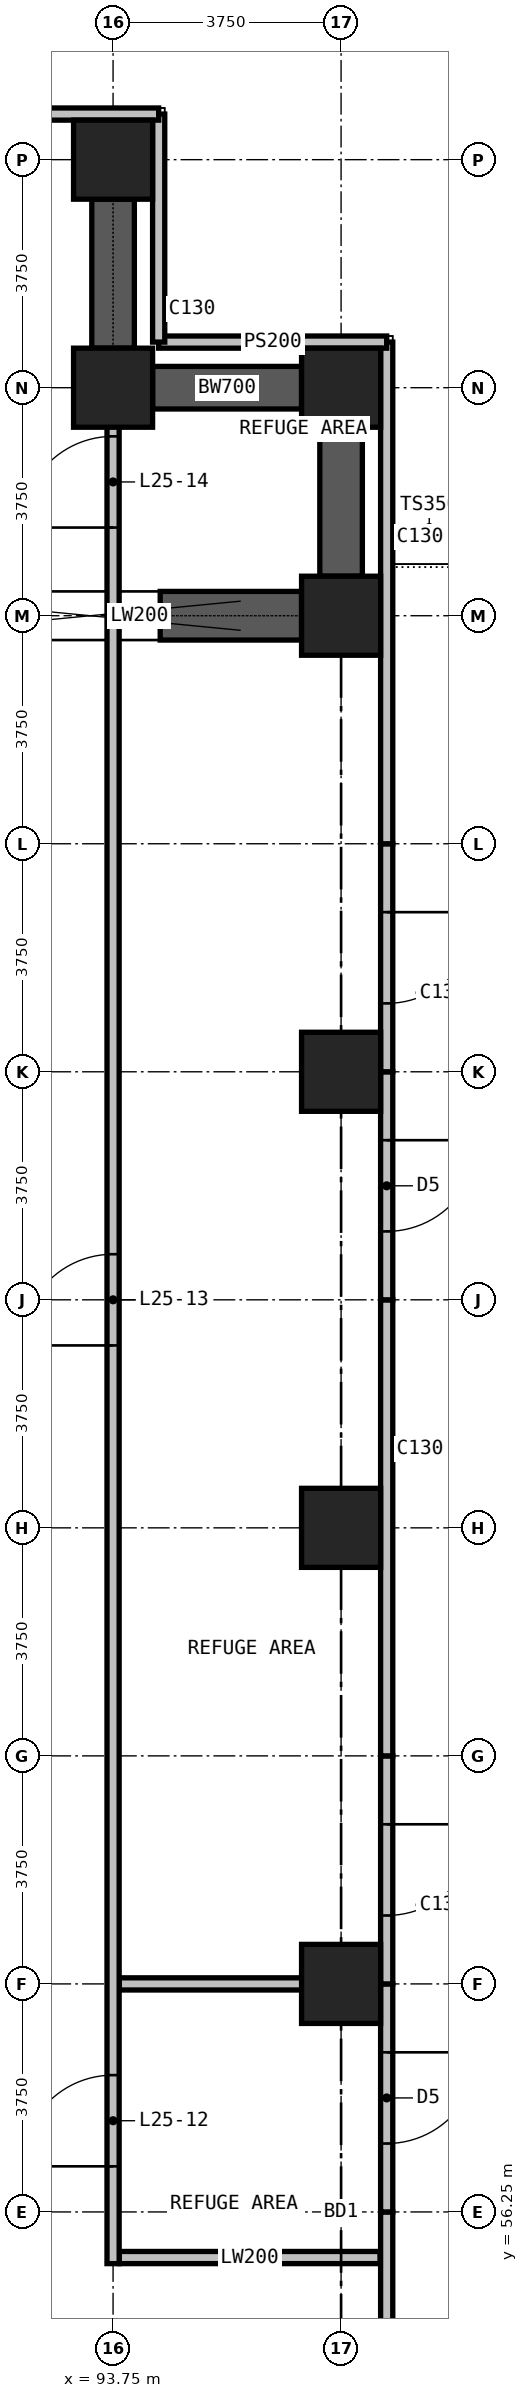
"""IFC4 building model, lengths in metres.
Left out: names, types, materials, properties, quantities, classifications, styles, units other than length and angle.
Written with IfcOpenShell. Run it as: python <this file> out.ifc"""

import sys

from ifc_helpers import new_model, si_unit, direction, frame, frame_2d, origin, origin_2d, place, context, subcontext, project, spatial, rectangle, extrude, element, fill, save


model = new_model("IFC4")
c1 = context("Model", 3, precision=1e-05, world=origin(), true_north=direction((0.0, 1.0)))
c2 = subcontext(c1, "Body", "Model", "MODEL_VIEW")
j1 = project(units=[si_unit("LENGTHUNIT", "METRE"), si_unit("PLANEANGLEUNIT", "RADIAN")], contexts=[c1])
p1 = place(None, origin())
s1 = spatial("IfcSite", under=j1, at=p1, CompositionType="ELEMENT")
p2 = place(p1, origin())
s2 = spatial("IfcBuilding", under=s1, at=p2, CompositionType="ELEMENT")
p3 = place(p2, frame((0.0, 0.0, 102.2)))
s3 = spatial("IfcBuildingStorey", under=s2, at=p3, CompositionType="ELEMENT", Elevation=102.2)
for number, where, z_axis, x_axis in (
    (1, (93.75, 86.25, 0.0), (0.0, 0.0, 1.0), (1.0, 0.0, 0.0)),
    (2, (93.75, 90.0, 0.0), (0.0, 0.0, 1.0), (1.0, 0.0, 0.0)),
    (3, (97.5, 60.0, 0.0), (0.0, 0.0, 1.0), (1.0, 0.0, 0.0)),
    (4, (97.5, 67.5, 0.0), (0.0, 0.0, 1.0), (1.0, 0.0, 0.0)),
    (5, (97.5, 75.0, 0.0), (0.0, 0.0, 1.0), (1.0, 0.0, 0.0)),
    (6, (97.5, 82.5, 0.0), (0.0, 0.0, 1.0), (1.0, 0.0, 0.0)),
    (7, (97.5, 86.25, 0.0), (0.0, 0.0, 1.0), (1.0, 0.0, 0.0)),
):
    element("IfcColumn", number, at=place(p3, frame(where, z_axis=z_axis, x_axis=x_axis)), inside=s3, PredefinedType="COLUMN", context=c2, shape_type="SweptSolid", body=[
        extrude(rectangle(XDim=1.3, YDim=1.3, at=origin_2d()), origin(), (0.0, 0.0, 1.0), 5.0),
    ])
for number, where, z_axis, x_axis in (
    (8, (93.75, 89.35, 0.0), (0.0, 0.0, 1.0), (0.0, -1.0, 0.0)),
    (9, (94.4, 86.25, 0.0), (0.0, 0.0, 1.0), (1.0, 0.0, 0.0)),
    (10, (97.5, 85.6, 0.0), (0.0, 0.0, 1.0), (0.0, -1.0, 0.0)),
):
    element("IfcWall", number, at=place(p3, frame(where, z_axis=z_axis, x_axis=x_axis)), inside=s3, PredefinedType="SHEAR", context=c2, shape_type="SweptSolid", body=[
        extrude(rectangle(XDim=2.45, YDim=0.7, at=frame_2d((1.225, 0.0))), origin(), (0.0, 0.0, 1.0), 4.7),
    ])
p4 = place(p3, frame((94.525, 82.5, 0.0), z_axis=(0.0, 0.0, 1.0), x_axis=(1.0, 0.0, 0.0)))
e11 = element("IfcWall", 11, at=p4, inside=s3, PredefinedType="SHEAR", context=c2, shape_type="SweptSolid", body=[
    extrude(rectangle(XDim=2.325, YDim=0.8, at=frame_2d((1.163, 0.0))), origin(), (0.0, 0.0, 1.0), 4.7),
])
p5 = place(p3, frame((98.25, 51.75, 0.0), z_axis=(0.0, 0.0, 1.0), x_axis=(0.0, 1.0, 0.0)))
e12 = element("IfcWall", 12, at=p5, inside=s3, PredefinedType="SOLIDWALL", context=c2, shape_type="SweptSolid", body=[
    extrude(rectangle(XDim=4.5, YDim=0.2, at=frame_2d((2.25, 0.0))), origin(), (0.0, 0.0, 1.0), 4.7),
])
p6 = place(p3, frame((98.25, 60.0, 0.0), z_axis=(0.0, 0.0, 1.0), x_axis=(0.0, -1.0, 0.0)))
e13 = element("IfcWall", 13, at=p6, inside=s3, PredefinedType="SOLIDWALL", context=c2, shape_type="SweptSolid", body=[
    extrude(rectangle(XDim=3.75, YDim=0.2, at=frame_2d((1.875, 0.0))), origin(), (0.0, 0.0, 1.0), 4.7),
])
p7 = place(p6, frame((1.125, 0.0, 0.0)))
e14 = element("IfcOpeningElement", 14, at=p7, cuts=e13, PredefinedType="OPENING", context=c2, shape_type="SweptSolid", body=[
    extrude(rectangle(XDim=1.5, YDim=2.4, at=frame_2d((0.75, 1.2))), frame((0.0, 0.11, 0.0), z_axis=(0.0, -1.0, 0.0), x_axis=(1.0, 0.0, 0.0)), (0.0, 0.0, 1.0), 0.22),
])
p8 = place(p3, frame((98.25, 63.75, 0.0), z_axis=(0.0, 0.0, 1.0), x_axis=(0.0, -1.0, 0.0)))
e15 = element("IfcWall", 15, at=p8, inside=s3, PredefinedType="SOLIDWALL", context=c2, shape_type="SweptSolid", body=[
    extrude(rectangle(XDim=3.75, YDim=0.2, at=frame_2d((1.875, 0.0))), origin(), (0.0, 0.0, 1.0), 4.7),
])
p9 = place(p8, frame((1.125, 0.0, 0.0)))
e16 = element("IfcOpeningElement", 16, at=p9, cuts=e15, PredefinedType="OPENING", context=c2, shape_type="SweptSolid", body=[
    extrude(rectangle(XDim=1.5, YDim=2.4, at=frame_2d((0.75, 1.2))), frame((0.0, 0.11, 0.0), z_axis=(0.0, -1.0, 0.0), x_axis=(1.0, 0.0, 0.0)), (0.0, 0.0, 1.0), 0.22),
])
p10 = place(p3, frame((98.25, 63.75, 0.0), z_axis=(0.0, 0.0, 1.0), x_axis=(0.0, 1.0, 0.0)))
e17 = element("IfcWall", 17, at=p10, inside=s3, PredefinedType="SOLIDWALL", context=c2, shape_type="SweptSolid", body=[
    extrude(rectangle(XDim=7.5, YDim=0.2, at=frame_2d((3.75, 0.0))), origin(), (0.0, 0.0, 1.0), 4.7),
])
p11 = place(p3, frame((98.25, 75.0, 0.0), z_axis=(0.0, 0.0, 1.0), x_axis=(0.0, -1.0, 0.0)))
e18 = element("IfcWall", 18, at=p11, inside=s3, PredefinedType="SOLIDWALL", context=c2, shape_type="SweptSolid", body=[
    extrude(rectangle(XDim=3.75, YDim=0.2, at=frame_2d((1.875, 0.0))), origin(), (0.0, 0.0, 1.0), 4.7),
])
p12 = place(p11, frame((1.125, 0.0, 0.0)))
e19 = element("IfcOpeningElement", 19, at=p12, cuts=e18, PredefinedType="OPENING", context=c2, shape_type="SweptSolid", body=[
    extrude(rectangle(XDim=1.5, YDim=2.4, at=frame_2d((0.75, 1.2))), frame((0.0, 0.11, 0.0), z_axis=(0.0, -1.0, 0.0), x_axis=(1.0, 0.0, 0.0)), (0.0, 0.0, 1.0), 0.22),
])
p13 = place(p3, frame((98.25, 78.75, 0.0), z_axis=(0.0, 0.0, 1.0), x_axis=(0.0, -1.0, 0.0)))
e20 = element("IfcWall", 20, at=p13, inside=s3, PredefinedType="SOLIDWALL", context=c2, shape_type="SweptSolid", body=[
    extrude(rectangle(XDim=3.75, YDim=0.2, at=frame_2d((1.875, 0.0))), origin(), (0.0, 0.0, 1.0), 4.7),
])
p14 = place(p13, frame((1.125, 0.0, 0.0)))
e21 = element("IfcOpeningElement", 21, at=p14, cuts=e20, PredefinedType="OPENING", context=c2, shape_type="SweptSolid", body=[
    extrude(rectangle(XDim=1.5, YDim=2.4, at=frame_2d((0.75, 1.2))), frame((0.0, 0.11, 0.0), z_axis=(0.0, -1.0, 0.0), x_axis=(1.0, 0.0, 0.0)), (0.0, 0.0, 1.0), 0.22),
])
p15 = place(p3, frame((98.25, 78.75, 0.0), z_axis=(0.0, 0.0, 1.0), x_axis=(0.0, 1.0, 0.0)))
e22 = element("IfcWall", 22, at=p15, inside=s3, PredefinedType="SOLIDWALL", context=c2, shape_type="SweptSolid", body=[
    extrude(rectangle(XDim=8.25, YDim=0.2, at=frame_2d((4.125, 0.0))), origin(), (0.0, 0.0, 1.0), 4.7),
])
for number, where, z_axis, x_axis in (
    (23, (94.5, 87.0, 0.0), (0.0, 0.0, 1.0), (1.0, 0.0, 0.0)),
    (24, (94.5, 87.0, 0.0), (0.0, 0.0, 1.0), (0.0, 1.0, 0.0)),
    (25, (90.75, 90.75, 0.0), (0.0, 0.0, 1.0), (1.0, 0.0, 0.0)),
):
    element("IfcWall", number, at=place(p3, frame(where, z_axis=z_axis, x_axis=x_axis)), inside=s3, PredefinedType="SOLIDWALL", context=c2, shape_type="SweptSolid", body=[
        extrude(rectangle(XDim=3.75, YDim=0.2, at=frame_2d((1.875, 0.0))), origin(), (0.0, 0.0, 1.0), 4.7),
    ])
for number, where, z_axis, x_axis in (
    (26, (93.85, 55.5, 0.0), (0.0, 0.0, 1.0), (1.0, 0.0, 0.0)),
    (27, (93.85, 60.0, 0.0), (0.0, 0.0, 1.0), (1.0, 0.0, 0.0)),
):
    element("IfcWall", number, at=place(p3, frame(where, z_axis=z_axis, x_axis=x_axis)), inside=s3, PredefinedType="PARTITIONING", context=c2, shape_type="SweptSolid", body=[
        extrude(rectangle(XDim=4.29, YDim=0.2, at=frame_2d((2.145, 0.0))), origin(), (0.0, 0.0, 1.0), 4.7),
    ])
p16 = place(p3, frame((93.85, 82.5, 0.0), z_axis=(0.0, 0.0, 1.0), x_axis=(1.0, 0.0, 0.0)))
e28 = element("IfcWall", 28, at=p16, inside=s3, PredefinedType="PARTITIONING", context=c2, shape_type="SweptSolid", body=[
    extrude(rectangle(XDim=0.665, YDim=0.2, at=frame_2d((0.333, 0.0))), origin(), (0.0, 0.0, 1.0), 2.4),
])
p17 = place(p3, frame((96.86, 82.5, 0.0), z_axis=(0.0, 0.0, 1.0), x_axis=(1.0, 0.0, 0.0)))
e29 = element("IfcWall", 29, at=p17, inside=s3, PredefinedType="PARTITIONING", context=c2, shape_type="SweptSolid", body=[
    extrude(rectangle(XDim=1.28, YDim=0.2, at=frame_2d((0.64, 0.0))), origin(), (0.0, 0.0, 1.0), 4.7),
])
p18 = place(p3, frame((93.75, 55.4, 0.0), z_axis=(0.0, 0.0, 1.0), x_axis=(0.0, 1.0, 0.0)))
e30 = element("IfcWall", 30, at=p18, inside=s3, PredefinedType="PARTITIONING", context=c2, shape_type="SweptSolid", body=[
    extrude(rectangle(XDim=31.49, YDim=0.2, at=frame_2d((15.745, 0.0))), origin(), (0.0, 0.0, 1.0), 4.7),
])
p19 = place(p18, frame((1.6, 0.0, 0.0)))
e31 = element("IfcOpeningElement", 31, at=p19, cuts=e30, PredefinedType="OPENING", context=c2, shape_type="SweptSolid", body=[
    extrude(rectangle(XDim=1.5, YDim=2.2, at=frame_2d((0.75, 1.1))), frame((0.0, 0.11, 0.0), z_axis=(0.0, -1.0, 0.0), x_axis=(1.0, 0.0, 0.0)), (0.0, 0.0, 1.0), 0.22),
])
p20 = place(p18, frame((15.1, 0.0, 0.0)))
e32 = element("IfcOpeningElement", 32, at=p20, cuts=e30, PredefinedType="OPENING", context=c2, shape_type="SweptSolid", body=[
    extrude(rectangle(XDim=1.5, YDim=2.2, at=frame_2d((0.75, 1.1))), frame((0.0, 0.11, 0.0), z_axis=(0.0, -1.0, 0.0), x_axis=(1.0, 0.0, 0.0)), (0.0, 0.0, 1.0), 0.22),
])
p21 = place(p18, frame((28.55, 0.0, 0.0)))
e33 = element("IfcOpeningElement", 33, at=p21, cuts=e30, PredefinedType="OPENING", context=c2, shape_type="SweptSolid", body=[
    extrude(rectangle(XDim=1.5, YDim=2.2, at=frame_2d((0.75, 1.1))), frame((0.0, 0.11, 0.0), z_axis=(0.0, -1.0, 0.0), x_axis=(1.0, 0.0, 0.0)), (0.0, 0.0, 1.0), 0.22),
])
p22 = place(p3, frame((93.75, 89.36, 0.0), z_axis=(0.0, 0.0, 1.0), x_axis=(0.0, 1.0, 0.0)))
e34 = element("IfcWall", 34, at=p22, inside=s3, PredefinedType="PARTITIONING", context=c2, shape_type="SweptSolid", body=[
    extrude(rectangle(XDim=1.28, YDim=0.2, at=frame_2d((0.64, 0.0))), origin(), (0.0, 0.0, 1.0), 4.7),
])
p23 = place(p7, origin())
e35 = element("IfcDoor", 35, at=p23, inside=s3, OperationType="DOUBLE_DOOR_SINGLE_SWING", PredefinedType="DOOR", context=c2, shape_type="SweptSolid", body=[
    extrude(rectangle(XDim=1.5, YDim=2.4, at=frame_2d((0.75, 1.2))), frame((0.0, 0.025, 0.0), z_axis=(0.0, -1.0, 0.0), x_axis=(1.0, 0.0, 0.0)), (0.0, 0.0, 1.0), 0.05),
])
fill(e14, e35)
p24 = place(p9, origin())
e36 = element("IfcDoor", 36, at=p24, inside=s3, OperationType="DOUBLE_DOOR_SINGLE_SWING", PredefinedType="DOOR", context=c2, shape_type="SweptSolid", body=[
    extrude(rectangle(XDim=1.5, YDim=2.4, at=frame_2d((0.75, 1.2))), frame((0.0, 0.025, 0.0), z_axis=(0.0, -1.0, 0.0), x_axis=(1.0, 0.0, 0.0)), (0.0, 0.0, 1.0), 0.05),
])
fill(e16, e36)
p25 = place(p12, origin())
e37 = element("IfcDoor", 37, at=p25, inside=s3, OperationType="DOUBLE_DOOR_SINGLE_SWING", PredefinedType="DOOR", context=c2, shape_type="SweptSolid", body=[
    extrude(rectangle(XDim=1.5, YDim=2.4, at=frame_2d((0.75, 1.2))), frame((0.0, 0.025, 0.0), z_axis=(0.0, -1.0, 0.0), x_axis=(1.0, 0.0, 0.0)), (0.0, 0.0, 1.0), 0.05),
])
fill(e19, e37)
p26 = place(p14, origin())
e38 = element("IfcDoor", 38, at=p26, inside=s3, OperationType="DOUBLE_DOOR_SINGLE_SWING", PredefinedType="DOOR", context=c2, shape_type="SweptSolid", body=[
    extrude(rectangle(XDim=1.5, YDim=2.4, at=frame_2d((0.75, 1.2))), frame((0.0, 0.025, 0.0), z_axis=(0.0, -1.0, 0.0), x_axis=(1.0, 0.0, 0.0)), (0.0, 0.0, 1.0), 0.05),
])
fill(e21, e38)
p27 = place(p19, origin())
e39 = element("IfcDoor", 39, at=p27, inside=s3, OperationType="DOUBLE_DOOR_SINGLE_SWING", PredefinedType="DOOR", context=c2, shape_type="SweptSolid", body=[
    extrude(rectangle(XDim=1.5, YDim=2.2, at=frame_2d((0.75, 1.1))), frame((0.0, 0.025, 0.0), z_axis=(0.0, -1.0, 0.0), x_axis=(1.0, 0.0, 0.0)), (0.0, 0.0, 1.0), 0.05),
])
fill(e31, e39)
p28 = place(p20, origin())
e40 = element("IfcDoor", 40, at=p28, inside=s3, OperationType="DOUBLE_DOOR_SINGLE_SWING", PredefinedType="DOOR", context=c2, shape_type="SweptSolid", body=[
    extrude(rectangle(XDim=1.5, YDim=2.2, at=frame_2d((0.75, 1.1))), frame((0.0, 0.025, 0.0), z_axis=(0.0, -1.0, 0.0), x_axis=(1.0, 0.0, 0.0)), (0.0, 0.0, 1.0), 0.05),
])
fill(e32, e40)
p29 = place(p21, origin())
e41 = element("IfcDoor", 41, at=p29, inside=s3, OperationType="DOUBLE_DOOR_SINGLE_SWING", PredefinedType="DOOR", context=c2, shape_type="SweptSolid", body=[
    extrude(rectangle(XDim=1.5, YDim=2.2, at=frame_2d((0.75, 1.1))), frame((0.0, 0.025, 0.0), z_axis=(0.0, -1.0, 0.0), x_axis=(1.0, 0.0, 0.0)), (0.0, 0.0, 1.0), 0.05),
])
fill(e33, e41)
save(model, sys.argv[1])
